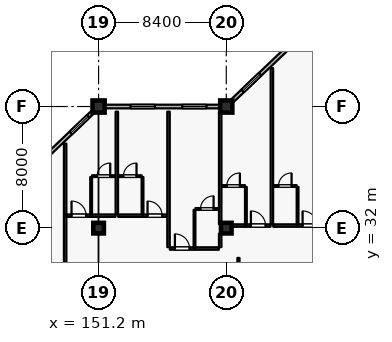
"""IFC4 building model, lengths in metres.
Left out: names, types, materials, properties, quantities, classifications, styles, units other than length and angle.
Written with IfcOpenShell. Run it as: python <this file> out.ifc"""

import sys

from ifc_helpers import new_model, si_unit, direction, frame, frame_2d, origin, origin_2d, place, context, subcontext, project, spatial, rectangle, extrude, element, fill, save


model = new_model("IFC4")
c1 = context("Model", 3, precision=1e-05, world=origin(), true_north=direction((0.0, 1.0)))
c2 = subcontext(c1, "Body", "Model", "MODEL_VIEW")
j1 = project(units=[si_unit("LENGTHUNIT", "METRE"), si_unit("PLANEANGLEUNIT", "RADIAN")], contexts=[c1])
p1 = place(None, origin())
s1 = spatial("IfcSite", under=j1, at=p1, CompositionType="ELEMENT")
p2 = place(p1, origin())
s2 = spatial("IfcBuilding", under=s1, at=p2, CompositionType="ELEMENT")
p3 = place(p2, frame((0.0, 0.0, 25.2)))
s3 = spatial("IfcBuildingStorey", under=s2, at=p3, CompositionType="ELEMENT", Elevation=25.2)
for number, where, z_axis, x_axis in (
    (1, (151.2, 40.0, 0.0), (0.0, 0.0, 1.0), (1.0, 0.0, 0.0)),
    (2, (159.6, 40.0, 0.0), (0.0, 0.0, 1.0), (1.0, 0.0, 0.0)),
):
    element("IfcColumn", number, at=place(p3, frame(where, z_axis=z_axis, x_axis=x_axis)), inside=s3, PredefinedType="COLUMN", context=c2, shape_type="SweptSolid", body=[
        extrude(rectangle(XDim=0.8, YDim=0.8, at=origin_2d()), origin(), (0.0, 0.0, 1.0), 3.6),
    ])
for number, where, z_axis, x_axis in (
    (3, (151.2, 32.0, 0.0), (0.0, 0.0, 1.0), (1.0, 0.0, 0.0)),
    (4, (159.6, 32.0, 0.0), (0.0, 0.0, 1.0), (1.0, 0.0, 0.0)),
):
    element("IfcColumn", number, at=place(p3, frame(where, z_axis=z_axis, x_axis=x_axis)), inside=s3, PredefinedType="COLUMN", context=c2, shape_type="SweptSolid", body=[
        extrude(rectangle(XDim=0.7, YDim=0.7, at=origin_2d()), origin(), (0.0, 0.0, 1.0), 3.6),
    ])
p4 = place(p3, frame((143.2, 32.381, 0.0), z_axis=(0.0, 0.0, 1.0), x_axis=(0.724156739794, 0.689635422677, 0.0)))
e5 = element("IfcWall", 5, at=p4, inside=s3, PredefinedType="SOLIDWALL", context=c2, shape_type="SweptSolid", body=[
    extrude(rectangle(XDim=10.495, YDim=0.24, at=frame_2d((5.248, 0.0))), origin(), (0.0, 0.0, 1.0), 2.93),
])
p5 = place(p4, frame((0.788, 0.0, 0.8)))
e6 = element("IfcOpeningElement", 6, at=p5, cuts=e5, PredefinedType="OPENING", context=c2, shape_type="SweptSolid", body=[
    extrude(rectangle(XDim=1.6, YDim=1.6, at=frame_2d((0.8, 0.8))), frame((0.0, 0.13, 0.0), z_axis=(0.0, -1.0, 0.0), x_axis=(1.0, 0.0, 0.0)), (0.0, 0.0, 1.0), 0.26),
])
p6 = place(p4, frame((4.862, 0.0, 0.8)))
e7 = element("IfcOpeningElement", 7, at=p6, cuts=e5, PredefinedType="OPENING", context=c2, shape_type="SweptSolid", body=[
    extrude(rectangle(XDim=1.6, YDim=1.6, at=frame_2d((0.8, 0.8))), frame((0.0, 0.13, 0.0), z_axis=(0.0, -1.0, 0.0), x_axis=(1.0, 0.0, 0.0)), (0.0, 0.0, 1.0), 0.26),
])
p7 = place(p4, frame((8.521, 0.0, 0.8)))
e8 = element("IfcOpeningElement", 8, at=p7, cuts=e5, PredefinedType="OPENING", context=c2, shape_type="SweptSolid", body=[
    extrude(rectangle(XDim=1.6, YDim=1.6, at=frame_2d((0.8, 0.8))), frame((0.0, 0.13, 0.0), z_axis=(0.0, -1.0, 0.0), x_axis=(1.0, 0.0, 0.0)), (0.0, 0.0, 1.0), 0.26),
])
p8 = place(p3, frame((151.6, 40.0, 0.0), z_axis=(0.0, 0.0, 1.0), x_axis=(1.0, 0.0, 0.0)))
e9 = element("IfcWall", 9, at=p8, inside=s3, PredefinedType="SOLIDWALL", context=c2, shape_type="SweptSolid", body=[
    extrude(rectangle(XDim=7.6, YDim=0.24, at=frame_2d((3.8, 0.0))), origin(), (0.0, 0.0, 1.0), 2.93),
])
p9 = place(p8, frame((1.7, 0.0, 0.8)))
e10 = element("IfcOpeningElement", 10, at=p9, cuts=e9, PredefinedType="OPENING", context=c2, shape_type="SweptSolid", body=[
    extrude(rectangle(XDim=1.6, YDim=1.6, at=frame_2d((0.8, 0.8))), frame((0.0, 0.13, 0.0), z_axis=(0.0, -1.0, 0.0), x_axis=(1.0, 0.0, 0.0)), (0.0, 0.0, 1.0), 0.26),
])
p10 = place(p8, frame((5.1, 0.0, 0.8)))
e11 = element("IfcOpeningElement", 11, at=p10, cuts=e9, PredefinedType="OPENING", context=c2, shape_type="SweptSolid", body=[
    extrude(rectangle(XDim=1.6, YDim=1.6, at=frame_2d((0.8, 0.8))), frame((0.0, 0.13, 0.0), z_axis=(0.0, -1.0, 0.0), x_axis=(1.0, 0.0, 0.0)), (0.0, 0.0, 1.0), 0.26),
])
p11 = place(p3, frame((160.0, 40.381, 0.0), z_axis=(0.0, 0.0, 1.0), x_axis=(0.724156739794, 0.689635422677, 0.0)))
e12 = element("IfcWall", 12, at=p11, inside=s3, PredefinedType="SOLIDWALL", context=c2, shape_type="SweptSolid", body=[
    extrude(rectangle(XDim=10.495, YDim=0.24, at=frame_2d((5.248, 0.0))), origin(), (0.0, 0.0, 1.0), 2.93),
])
p12 = place(p11, frame((0.926, 0.0, 0.8)))
e13 = element("IfcOpeningElement", 13, at=p12, cuts=e12, PredefinedType="OPENING", context=c2, shape_type="SweptSolid", body=[
    extrude(rectangle(XDim=1.6, YDim=1.6, at=frame_2d((0.8, 0.8))), frame((0.0, 0.13, 0.0), z_axis=(0.0, -1.0, 0.0), x_axis=(1.0, 0.0, 0.0)), (0.0, 0.0, 1.0), 0.26),
])
p13 = place(p11, frame((5.138, 0.0, 0.8)))
e14 = element("IfcOpeningElement", 14, at=p13, cuts=e12, PredefinedType="OPENING", context=c2, shape_type="SweptSolid", body=[
    extrude(rectangle(XDim=1.6, YDim=1.6, at=frame_2d((0.8, 0.8))), frame((0.0, 0.13, 0.0), z_axis=(0.0, -1.0, 0.0), x_axis=(1.0, 0.0, 0.0)), (0.0, 0.0, 1.0), 0.26),
])
p14 = place(p11, frame((8.659, 0.0, 0.8)))
e15 = element("IfcOpeningElement", 15, at=p14, cuts=e12, PredefinedType="OPENING", context=c2, shape_type="SweptSolid", body=[
    extrude(rectangle(XDim=1.6, YDim=1.6, at=frame_2d((0.8, 0.8))), frame((0.0, 0.13, 0.0), z_axis=(0.0, -1.0, 0.0), x_axis=(1.0, 0.0, 0.0)), (0.0, 0.0, 1.0), 0.26),
])
p15 = place(p3, frame((149.0, 28.46, 0.0), z_axis=(0.0, 0.0, 1.0), x_axis=(0.0, 1.0, 0.0)))
e16 = element("IfcWall", 16, at=p15, inside=s3, PredefinedType="PARTITIONING", context=c2, shape_type="SweptSolid", body=[
    extrude(rectangle(XDim=4.44, YDim=0.16, at=frame_2d((2.22, 0.0))), origin(), (0.0, 0.0, 1.0), 3.335),
])
p16 = place(p3, frame((149.09, 32.82, 0.0), z_axis=(0.0, 0.0, 1.0), x_axis=(1.0, 0.0, 0.0)))
e17 = element("IfcWall", 17, at=p16, inside=s3, PredefinedType="PARTITIONING", context=c2, shape_type="SweptSolid", body=[
    extrude(rectangle(XDim=1.62, YDim=0.16, at=frame_2d((0.81, 0.0))), origin(), (0.0, 0.0, 1.0), 3.335),
])
p17 = place(p16, frame((0.33, 0.0, 0.0)))
e18 = element("IfcOpeningElement", 18, at=p17, cuts=e17, PredefinedType="OPENING", context=c2, shape_type="SweptSolid", body=[
    extrude(rectangle(XDim=0.96, YDim=2.2, at=frame_2d((0.48, 1.1))), frame((0.0, 0.09, 0.0), z_axis=(0.0, -1.0, 0.0), x_axis=(1.0, 0.0, 0.0)), (0.0, 0.0, 1.0), 0.18),
])
p18 = place(p3, frame((150.72, 32.82, 0.0), z_axis=(0.0, 0.0, 1.0), x_axis=(1.0, 0.0, 0.0)))
e19 = element("IfcWall", 19, at=p18, inside=s3, PredefinedType="PARTITIONING", context=c2, shape_type="SweptSolid", body=[
    extrude(rectangle(XDim=1.59, YDim=0.16, at=frame_2d((0.795, 0.0))), origin(), (0.0, 0.0, 1.0), 3.335),
])
p19 = place(p3, frame((150.71, 32.91, 0.0), z_axis=(0.0, 0.0, 1.0), x_axis=(0.0, 1.0, 0.0)))
e20 = element("IfcWall", 20, at=p19, inside=s3, PredefinedType="PARTITIONING", context=c2, shape_type="SweptSolid", body=[
    extrude(rectangle(XDim=2.45, YDim=0.115, at=frame_2d((1.225, 0.0))), origin(), (0.0, 0.0, 1.0), 3.335),
])
p20 = place(p3, frame((150.77, 35.42, 0.0), z_axis=(0.0, 0.0, 1.0), x_axis=(1.0, 0.0, 0.0)))
e21 = element("IfcWall", 21, at=p20, inside=s3, PredefinedType="PARTITIONING", context=c2, shape_type="SweptSolid", body=[
    extrude(rectangle(XDim=1.53, YDim=0.115, at=frame_2d((0.765, 0.0))), origin(), (0.0, 0.0, 1.0), 3.335),
])
p21 = place(p20, frame((0.335, 0.0, 0.0)))
e22 = element("IfcOpeningElement", 22, at=p21, cuts=e21, PredefinedType="OPENING", context=c2, shape_type="SweptSolid", body=[
    extrude(rectangle(XDim=0.86, YDim=2.12, at=frame_2d((0.43, 1.06))), frame((0.0, 0.067, 0.0), z_axis=(0.0, -1.0, 0.0), x_axis=(1.0, 0.0, 0.0)), (0.0, 0.0, 1.0), 0.135),
])
p22 = place(p3, frame((149.0, 32.91, 0.0), z_axis=(0.0, 0.0, 1.0), x_axis=(0.0, 1.0, 0.0)))
e23 = element("IfcWall", 23, at=p22, inside=s3, PredefinedType="PARTITIONING", context=c2, shape_type="SweptSolid", body=[
    extrude(rectangle(XDim=4.65, YDim=0.16, at=frame_2d((2.325, 0.0))), origin(), (0.0, 0.0, 1.0), 3.335),
])
p23 = place(p3, frame((152.49, 32.82, 0.0), z_axis=(0.0, 0.0, 1.0), x_axis=(1.0, 0.0, 0.0)))
e24 = element("IfcWall", 24, at=p23, inside=s3, PredefinedType="PARTITIONING", context=c2, shape_type="SweptSolid", body=[
    extrude(rectangle(XDim=1.59, YDim=0.16, at=frame_2d((0.795, 0.0))), origin(), (0.0, 0.0, 1.0), 3.335),
])
p24 = place(p3, frame((154.09, 32.82, 0.0), z_axis=(0.0, 0.0, 1.0), x_axis=(1.0, 0.0, 0.0)))
e25 = element("IfcWall", 25, at=p24, inside=s3, PredefinedType="PARTITIONING", context=c2, shape_type="SweptSolid", body=[
    extrude(rectangle(XDim=1.62, YDim=0.16, at=frame_2d((0.81, 0.0))), origin(), (0.0, 0.0, 1.0), 3.335),
])
p25 = place(p24, frame((0.33, 0.0, 0.0)))
e26 = element("IfcOpeningElement", 26, at=p25, cuts=e25, PredefinedType="OPENING", context=c2, shape_type="SweptSolid", body=[
    extrude(rectangle(XDim=0.96, YDim=2.2, at=frame_2d((0.48, 1.1))), frame((0.0, 0.09, 0.0), z_axis=(0.0, -1.0, 0.0), x_axis=(1.0, 0.0, 0.0)), (0.0, 0.0, 1.0), 0.18),
])
p26 = place(p3, frame((154.09, 32.91, 0.0), z_axis=(0.0, 0.0, 1.0), x_axis=(0.0, 1.0, 0.0)))
e27 = element("IfcWall", 27, at=p26, inside=s3, PredefinedType="PARTITIONING", context=c2, shape_type="SweptSolid", body=[
    extrude(rectangle(XDim=2.45, YDim=0.115, at=frame_2d((1.225, 0.0))), origin(), (0.0, 0.0, 1.0), 3.335),
])
p27 = place(p3, frame((152.5, 35.42, 0.0), z_axis=(0.0, 0.0, 1.0), x_axis=(1.0, 0.0, 0.0)))
e28 = element("IfcWall", 28, at=p27, inside=s3, PredefinedType="PARTITIONING", context=c2, shape_type="SweptSolid", body=[
    extrude(rectangle(XDim=1.53, YDim=0.115, at=frame_2d((0.765, 0.0))), origin(), (0.0, 0.0, 1.0), 3.335),
])
p28 = place(p27, frame((0.335, 0.0, 0.0)))
e29 = element("IfcOpeningElement", 29, at=p28, cuts=e28, PredefinedType="OPENING", context=c2, shape_type="SweptSolid", body=[
    extrude(rectangle(XDim=0.86, YDim=2.12, at=frame_2d((0.43, 1.06))), frame((0.0, 0.067, 0.0), z_axis=(0.0, -1.0, 0.0), x_axis=(1.0, 0.0, 0.0)), (0.0, 0.0, 1.0), 0.135),
])
p29 = place(p3, frame((152.4, 32.91, 0.0), z_axis=(0.0, 0.0, 1.0), x_axis=(0.0, 1.0, 0.0)))
e30 = element("IfcWall", 30, at=p29, inside=s3, PredefinedType="PARTITIONING", context=c2, shape_type="SweptSolid", body=[
    extrude(rectangle(XDim=6.75, YDim=0.16, at=frame_2d((3.375, 0.0))), origin(), (0.0, 0.0, 1.0), 3.335),
])
p30 = place(p3, frame((155.89, 30.66, 0.0), z_axis=(0.0, 0.0, 1.0), x_axis=(1.0, 0.0, 0.0)))
e31 = element("IfcWall", 31, at=p30, inside=s3, PredefinedType="PARTITIONING", context=c2, shape_type="SweptSolid", body=[
    extrude(rectangle(XDim=1.62, YDim=0.16, at=frame_2d((0.81, 0.0))), origin(), (0.0, 0.0, 1.0), 3.335),
])
p31 = place(p30, frame((0.33, 0.0, 0.0)))
e32 = element("IfcOpeningElement", 32, at=p31, cuts=e31, PredefinedType="OPENING", context=c2, shape_type="SweptSolid", body=[
    extrude(rectangle(XDim=0.96, YDim=2.2, at=frame_2d((0.48, 1.1))), frame((0.0, 0.09, 0.0), z_axis=(0.0, -1.0, 0.0), x_axis=(1.0, 0.0, 0.0)), (0.0, 0.0, 1.0), 0.18),
])
p32 = place(p3, frame((157.52, 30.66, 0.0), z_axis=(0.0, 0.0, 1.0), x_axis=(1.0, 0.0, 0.0)))
e33 = element("IfcWall", 33, at=p32, inside=s3, PredefinedType="PARTITIONING", context=c2, shape_type="SweptSolid", body=[
    extrude(rectangle(XDim=1.59, YDim=0.16, at=frame_2d((0.795, 0.0))), origin(), (0.0, 0.0, 1.0), 3.335),
])
p33 = place(p3, frame((157.51, 30.75, 0.0), z_axis=(0.0, 0.0, 1.0), x_axis=(0.0, 1.0, 0.0)))
e34 = element("IfcWall", 34, at=p33, inside=s3, PredefinedType="PARTITIONING", context=c2, shape_type="SweptSolid", body=[
    extrude(rectangle(XDim=2.45, YDim=0.115, at=frame_2d((1.225, 0.0))), origin(), (0.0, 0.0, 1.0), 3.335),
])
p34 = place(p3, frame((157.57, 33.26, 0.0), z_axis=(0.0, 0.0, 1.0), x_axis=(1.0, 0.0, 0.0)))
e35 = element("IfcWall", 35, at=p34, inside=s3, PredefinedType="PARTITIONING", context=c2, shape_type="SweptSolid", body=[
    extrude(rectangle(XDim=1.53, YDim=0.115, at=frame_2d((0.765, 0.0))), origin(), (0.0, 0.0, 1.0), 3.335),
])
p35 = place(p34, frame((0.335, 0.0, 0.0)))
e36 = element("IfcOpeningElement", 36, at=p35, cuts=e35, PredefinedType="OPENING", context=c2, shape_type="SweptSolid", body=[
    extrude(rectangle(XDim=0.86, YDim=2.12, at=frame_2d((0.43, 1.06))), frame((0.0, 0.067, 0.0), z_axis=(0.0, -1.0, 0.0), x_axis=(1.0, 0.0, 0.0)), (0.0, 0.0, 1.0), 0.135),
])
p36 = place(p3, frame((155.8, 30.75, 0.0), z_axis=(0.0, 0.0, 1.0), x_axis=(0.0, 1.0, 0.0)))
e37 = element("IfcWall", 37, at=p36, inside=s3, PredefinedType="PARTITIONING", context=c2, shape_type="SweptSolid", body=[
    extrude(rectangle(XDim=8.91, YDim=0.16, at=frame_2d((4.455, 0.0))), origin(), (0.0, 0.0, 1.0), 3.335),
])
p37 = place(p3, frame((159.2, 30.75, 0.0), z_axis=(0.0, 0.0, 1.0), x_axis=(0.0, 1.0, 0.0)))
e38 = element("IfcWall", 38, at=p37, inside=s3, PredefinedType="PARTITIONING", context=c2, shape_type="SweptSolid", body=[
    extrude(rectangle(XDim=0.89, YDim=0.16, at=frame_2d((0.445, 0.0))), origin(), (0.0, 0.0, 1.0), 3.335),
])
p38 = place(p3, frame((159.29, 32.17, 0.0), z_axis=(0.0, 0.0, 1.0), x_axis=(1.0, 0.0, 0.0)))
e39 = element("IfcWall", 39, at=p38, inside=s3, PredefinedType="PARTITIONING", context=c2, shape_type="SweptSolid", body=[
    extrude(rectangle(XDim=1.59, YDim=0.16, at=frame_2d((0.795, 0.0))), origin(), (0.0, 0.0, 1.0), 3.335),
])
p39 = place(p3, frame((160.89, 32.17, 0.0), z_axis=(0.0, 0.0, 1.0), x_axis=(1.0, 0.0, 0.0)))
e40 = element("IfcWall", 40, at=p39, inside=s3, PredefinedType="PARTITIONING", context=c2, shape_type="SweptSolid", body=[
    extrude(rectangle(XDim=1.62, YDim=0.16, at=frame_2d((0.81, 0.0))), origin(), (0.0, 0.0, 1.0), 3.335),
])
p40 = place(p39, frame((0.33, 0.0, 0.0)))
e41 = element("IfcOpeningElement", 41, at=p40, cuts=e40, PredefinedType="OPENING", context=c2, shape_type="SweptSolid", body=[
    extrude(rectangle(XDim=0.96, YDim=2.2, at=frame_2d((0.48, 1.1))), frame((0.0, 0.09, 0.0), z_axis=(0.0, -1.0, 0.0), x_axis=(1.0, 0.0, 0.0)), (0.0, 0.0, 1.0), 0.18),
])
p41 = place(p3, frame((160.89, 32.26, 0.0), z_axis=(0.0, 0.0, 1.0), x_axis=(0.0, 1.0, 0.0)))
e42 = element("IfcWall", 42, at=p41, inside=s3, PredefinedType="PARTITIONING", context=c2, shape_type="SweptSolid", body=[
    extrude(rectangle(XDim=2.45, YDim=0.115, at=frame_2d((1.225, 0.0))), origin(), (0.0, 0.0, 1.0), 3.335),
])
p42 = place(p3, frame((159.3, 34.77, 0.0), z_axis=(0.0, 0.0, 1.0), x_axis=(1.0, 0.0, 0.0)))
e43 = element("IfcWall", 43, at=p42, inside=s3, PredefinedType="PARTITIONING", context=c2, shape_type="SweptSolid", body=[
    extrude(rectangle(XDim=1.53, YDim=0.115, at=frame_2d((0.765, 0.0))), origin(), (0.0, 0.0, 1.0), 3.335),
])
p43 = place(p42, frame((0.335, 0.0, 0.0)))
e44 = element("IfcOpeningElement", 44, at=p43, cuts=e43, PredefinedType="OPENING", context=c2, shape_type="SweptSolid", body=[
    extrude(rectangle(XDim=0.86, YDim=2.12, at=frame_2d((0.43, 1.06))), frame((0.0, 0.067, 0.0), z_axis=(0.0, -1.0, 0.0), x_axis=(1.0, 0.0, 0.0)), (0.0, 0.0, 1.0), 0.135),
])
p44 = place(p3, frame((159.2, 32.26, 0.0), z_axis=(0.0, 0.0, 1.0), x_axis=(0.0, 1.0, 0.0)))
e45 = element("IfcWall", 45, at=p44, inside=s3, PredefinedType="PARTITIONING", context=c2, shape_type="SweptSolid", body=[
    extrude(rectangle(XDim=7.4, YDim=0.16, at=frame_2d((3.7, 0.0))), origin(), (0.0, 0.0, 1.0), 3.335),
])
p45 = place(p3, frame((162.69, 32.17, 0.0), z_axis=(0.0, 0.0, 1.0), x_axis=(1.0, 0.0, 0.0)))
e46 = element("IfcWall", 46, at=p45, inside=s3, PredefinedType="PARTITIONING", context=c2, shape_type="SweptSolid", body=[
    extrude(rectangle(XDim=1.59, YDim=0.16, at=frame_2d((0.795, 0.0))), origin(), (0.0, 0.0, 1.0), 3.335),
])
p46 = place(p3, frame((164.29, 32.17, 0.0), z_axis=(0.0, 0.0, 1.0), x_axis=(1.0, 0.0, 0.0)))
e47 = element("IfcWall", 47, at=p46, inside=s3, PredefinedType="PARTITIONING", context=c2, shape_type="SweptSolid", body=[
    extrude(rectangle(XDim=1.62, YDim=0.16, at=frame_2d((0.81, 0.0))), origin(), (0.0, 0.0, 1.0), 3.335),
])
p47 = place(p46, frame((0.33, 0.0, 0.0)))
e48 = element("IfcOpeningElement", 48, at=p47, cuts=e47, PredefinedType="OPENING", context=c2, shape_type="SweptSolid", body=[
    extrude(rectangle(XDim=0.96, YDim=2.2, at=frame_2d((0.48, 1.1))), frame((0.0, 0.09, 0.0), z_axis=(0.0, -1.0, 0.0), x_axis=(1.0, 0.0, 0.0)), (0.0, 0.0, 1.0), 0.18),
])
p48 = place(p3, frame((164.29, 32.26, 0.0), z_axis=(0.0, 0.0, 1.0), x_axis=(0.0, 1.0, 0.0)))
e49 = element("IfcWall", 49, at=p48, inside=s3, PredefinedType="PARTITIONING", context=c2, shape_type="SweptSolid", body=[
    extrude(rectangle(XDim=2.45, YDim=0.115, at=frame_2d((1.225, 0.0))), origin(), (0.0, 0.0, 1.0), 3.335),
])
p49 = place(p3, frame((162.7, 34.77, 0.0), z_axis=(0.0, 0.0, 1.0), x_axis=(1.0, 0.0, 0.0)))
e50 = element("IfcWall", 50, at=p49, inside=s3, PredefinedType="PARTITIONING", context=c2, shape_type="SweptSolid", body=[
    extrude(rectangle(XDim=1.53, YDim=0.115, at=frame_2d((0.765, 0.0))), origin(), (0.0, 0.0, 1.0), 3.335),
])
p50 = place(p49, frame((0.335, 0.0, 0.0)))
e51 = element("IfcOpeningElement", 51, at=p50, cuts=e50, PredefinedType="OPENING", context=c2, shape_type="SweptSolid", body=[
    extrude(rectangle(XDim=0.86, YDim=2.12, at=frame_2d((0.43, 1.06))), frame((0.0, 0.067, 0.0), z_axis=(0.0, -1.0, 0.0), x_axis=(1.0, 0.0, 0.0)), (0.0, 0.0, 1.0), 0.135),
])
p51 = place(p3, frame((162.6, 32.26, 0.0), z_axis=(0.0, 0.0, 1.0), x_axis=(0.0, 1.0, 0.0)))
e52 = element("IfcWall", 52, at=p51, inside=s3, PredefinedType="PARTITIONING", context=c2, shape_type="SweptSolid", body=[
    extrude(rectangle(XDim=10.26, YDim=0.16, at=frame_2d((5.13, 0.0))), origin(), (0.0, 0.0, 1.0), 3.335),
])
p52 = place(p3, frame((160.4, 24.96, 0.0), z_axis=(0.0, 0.0, 1.0), x_axis=(0.0, 1.0, 0.0)))
e53 = element("IfcWall", 53, at=p52, inside=s3, PredefinedType="PARTITIONING", context=c2, shape_type="SweptSolid", body=[
    extrude(rectangle(XDim=5.08, YDim=0.14, at=frame_2d((2.54, 0.0))), origin(), (0.0, 0.0, 1.0), 3.335),
])
p53 = place(p52, frame((1.59, 0.0, 0.0)))
e54 = element("IfcOpeningElement", 54, at=p53, cuts=e53, PredefinedType="OPENING", context=c2, shape_type="SweptSolid", body=[
    extrude(rectangle(XDim=1.9, YDim=2.4, at=frame_2d((0.95, 1.2))), frame((0.0, 0.08, 0.0), z_axis=(0.0, -1.0, 0.0), x_axis=(1.0, 0.0, 0.0)), (0.0, 0.0, 1.0), 0.16),
])
p54 = place(p7, origin())
e55 = element("IfcWindow", 55, at=p54, inside=s3, PartitioningType="SINGLE_PANEL", PredefinedType="WINDOW", context=c2, shape_type="SweptSolid", body=[
    extrude(rectangle(XDim=1.6, YDim=1.6, at=frame_2d((0.8, 0.8))), frame((0.0, 0.03, 0.0), z_axis=(0.0, -1.0, 0.0), x_axis=(1.0, 0.0, 0.0)), (0.0, 0.0, 1.0), 0.06),
])
fill(e8, e55)
p55 = place(p9, origin())
e56 = element("IfcWindow", 56, at=p55, inside=s3, PartitioningType="SINGLE_PANEL", PredefinedType="WINDOW", context=c2, shape_type="SweptSolid", body=[
    extrude(rectangle(XDim=1.6, YDim=1.6, at=frame_2d((0.8, 0.8))), frame((0.0, 0.03, 0.0), z_axis=(0.0, -1.0, 0.0), x_axis=(1.0, 0.0, 0.0)), (0.0, 0.0, 1.0), 0.06),
])
fill(e10, e56)
p56 = place(p10, origin())
e57 = element("IfcWindow", 57, at=p56, inside=s3, PartitioningType="SINGLE_PANEL", PredefinedType="WINDOW", context=c2, shape_type="SweptSolid", body=[
    extrude(rectangle(XDim=1.6, YDim=1.6, at=frame_2d((0.8, 0.8))), frame((0.0, 0.03, 0.0), z_axis=(0.0, -1.0, 0.0), x_axis=(1.0, 0.0, 0.0)), (0.0, 0.0, 1.0), 0.06),
])
fill(e11, e57)
p57 = place(p12, origin())
e58 = element("IfcWindow", 58, at=p57, inside=s3, PartitioningType="SINGLE_PANEL", PredefinedType="WINDOW", context=c2, shape_type="SweptSolid", body=[
    extrude(rectangle(XDim=1.6, YDim=1.6, at=frame_2d((0.8, 0.8))), frame((0.0, 0.03, 0.0), z_axis=(0.0, -1.0, 0.0), x_axis=(1.0, 0.0, 0.0)), (0.0, 0.0, 1.0), 0.06),
])
fill(e13, e58)
p58 = place(p17, origin())
e59 = element("IfcDoor", 59, at=p58, inside=s3, OperationType="SINGLE_SWING_LEFT", PredefinedType="DOOR", context=c2, shape_type="SweptSolid", body=[
    extrude(rectangle(XDim=0.96, YDim=2.2, at=frame_2d((0.48, 1.1))), frame((0.0, 0.025, 0.0), z_axis=(0.0, -1.0, 0.0), x_axis=(1.0, 0.0, 0.0)), (0.0, 0.0, 1.0), 0.05),
])
fill(e18, e59)
p59 = place(p21, origin())
e60 = element("IfcDoor", 60, at=p59, inside=s3, OperationType="SINGLE_SWING_RIGHT", PredefinedType="DOOR", context=c2, shape_type="SweptSolid", body=[
    extrude(rectangle(XDim=0.86, YDim=2.12, at=frame_2d((0.43, 1.06))), frame((0.0, 0.025, 0.0), z_axis=(0.0, -1.0, 0.0), x_axis=(1.0, 0.0, 0.0)), (0.0, 0.0, 1.0), 0.05),
])
fill(e22, e60)
p60 = place(p25, origin())
e61 = element("IfcDoor", 61, at=p60, inside=s3, OperationType="SINGLE_SWING_LEFT", PredefinedType="DOOR", context=c2, shape_type="SweptSolid", body=[
    extrude(rectangle(XDim=0.96, YDim=2.2, at=frame_2d((0.48, 1.1))), frame((0.0, 0.025, 0.0), z_axis=(0.0, -1.0, 0.0), x_axis=(1.0, 0.0, 0.0)), (0.0, 0.0, 1.0), 0.05),
])
fill(e26, e61)
p61 = place(p28, origin())
e62 = element("IfcDoor", 62, at=p61, inside=s3, OperationType="SINGLE_SWING_RIGHT", PredefinedType="DOOR", context=c2, shape_type="SweptSolid", body=[
    extrude(rectangle(XDim=0.86, YDim=2.12, at=frame_2d((0.43, 1.06))), frame((0.0, 0.025, 0.0), z_axis=(0.0, -1.0, 0.0), x_axis=(1.0, 0.0, 0.0)), (0.0, 0.0, 1.0), 0.05),
])
fill(e29, e62)
p62 = place(p31, origin())
e63 = element("IfcDoor", 63, at=p62, inside=s3, OperationType="SINGLE_SWING_LEFT", PredefinedType="DOOR", context=c2, shape_type="SweptSolid", body=[
    extrude(rectangle(XDim=0.96, YDim=2.2, at=frame_2d((0.48, 1.1))), frame((0.0, 0.025, 0.0), z_axis=(0.0, -1.0, 0.0), x_axis=(1.0, 0.0, 0.0)), (0.0, 0.0, 1.0), 0.05),
])
fill(e32, e63)
p63 = place(p35, origin())
e64 = element("IfcDoor", 64, at=p63, inside=s3, OperationType="SINGLE_SWING_RIGHT", PredefinedType="DOOR", context=c2, shape_type="SweptSolid", body=[
    extrude(rectangle(XDim=0.86, YDim=2.12, at=frame_2d((0.43, 1.06))), frame((0.0, 0.025, 0.0), z_axis=(0.0, -1.0, 0.0), x_axis=(1.0, 0.0, 0.0)), (0.0, 0.0, 1.0), 0.05),
])
fill(e36, e64)
p64 = place(p40, origin())
e65 = element("IfcDoor", 65, at=p64, inside=s3, OperationType="SINGLE_SWING_LEFT", PredefinedType="DOOR", context=c2, shape_type="SweptSolid", body=[
    extrude(rectangle(XDim=0.96, YDim=2.2, at=frame_2d((0.48, 1.1))), frame((0.0, 0.025, 0.0), z_axis=(0.0, -1.0, 0.0), x_axis=(1.0, 0.0, 0.0)), (0.0, 0.0, 1.0), 0.05),
])
fill(e41, e65)
p65 = place(p43, origin())
e66 = element("IfcDoor", 66, at=p65, inside=s3, OperationType="SINGLE_SWING_RIGHT", PredefinedType="DOOR", context=c2, shape_type="SweptSolid", body=[
    extrude(rectangle(XDim=0.86, YDim=2.12, at=frame_2d((0.43, 1.06))), frame((0.0, 0.025, 0.0), z_axis=(0.0, -1.0, 0.0), x_axis=(1.0, 0.0, 0.0)), (0.0, 0.0, 1.0), 0.05),
])
fill(e44, e66)
p66 = place(p47, origin())
e67 = element("IfcDoor", 67, at=p66, inside=s3, OperationType="SINGLE_SWING_LEFT", PredefinedType="DOOR", context=c2, shape_type="SweptSolid", body=[
    extrude(rectangle(XDim=0.96, YDim=2.2, at=frame_2d((0.48, 1.1))), frame((0.0, 0.025, 0.0), z_axis=(0.0, -1.0, 0.0), x_axis=(1.0, 0.0, 0.0)), (0.0, 0.0, 1.0), 0.05),
])
fill(e48, e67)
p67 = place(p50, origin())
e68 = element("IfcDoor", 68, at=p67, inside=s3, OperationType="SINGLE_SWING_RIGHT", PredefinedType="DOOR", context=c2, shape_type="SweptSolid", body=[
    extrude(rectangle(XDim=0.86, YDim=2.12, at=frame_2d((0.43, 1.06))), frame((0.0, 0.025, 0.0), z_axis=(0.0, -1.0, 0.0), x_axis=(1.0, 0.0, 0.0)), (0.0, 0.0, 1.0), 0.05),
])
fill(e51, e68)
save(model, sys.argv[1])
